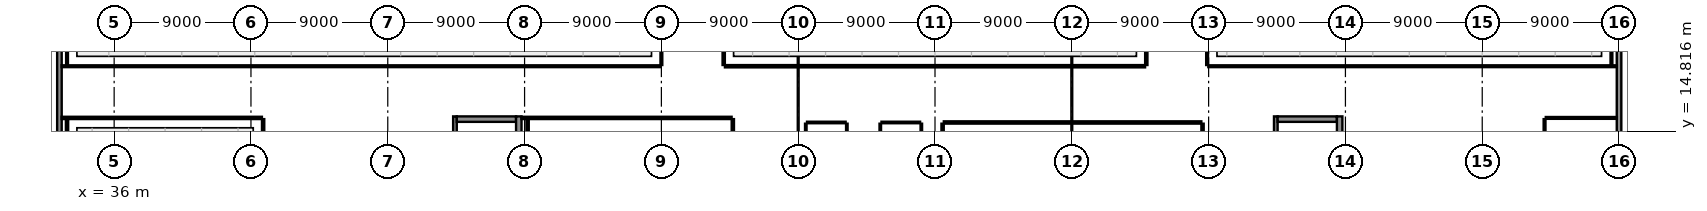
"""IFC4 building model, lengths in metres.
Left out: names, types, materials, properties, quantities, classifications, styles, units other than length and angle.
Written with IfcOpenShell. Run it as: python <this file> out.ifc"""

import sys

from ifc_helpers import new_model, si_unit, direction, frame, frame_2d, origin, place, context, subcontext, project, spatial, rectangle, extrude, element, fill, save


model = new_model("IFC4")
c1 = context("Model", 3, precision=1e-05, world=origin(), true_north=direction((0.0, 1.0)))
c2 = subcontext(c1, "Body", "Model", "MODEL_VIEW")
j1 = project(units=[si_unit("LENGTHUNIT", "METRE"), si_unit("PLANEANGLEUNIT", "RADIAN")], contexts=[c1])
p1 = place(None, origin())
s1 = spatial("IfcSite", under=j1, at=p1, CompositionType="ELEMENT")
p2 = place(p1, origin())
s2 = spatial("IfcBuilding", under=s1, at=p2, CompositionType="ELEMENT")
p3 = place(p2, frame((0.0, 0.0, 5.4)))
s3 = spatial("IfcBuildingStorey", under=s2, at=p3, CompositionType="ELEMENT", Elevation=5.4)
p4 = place(p3, frame((32.4, 23.96, 0.0), z_axis=(0.0, 0.0, 1.0), x_axis=(0.0, -1.0, 0.0)))
e1 = element("IfcWall", 1, at=p4, inside=s3, PredefinedType="SOLIDWALL", context=c2, shape_type="SweptSolid", body=[
    extrude(rectangle(XDim=11.97, YDim=0.3, at=frame_2d((5.985, 0.0))), origin(), (0.0, 0.0, 1.0), 3.455),
])
p5 = place(p4, frame((2.941, 0.0, 0.9)))
e2 = element("IfcOpeningElement", 2, at=p5, cuts=e1, PredefinedType="OPENING", context=c2, shape_type="SweptSolid", body=[
    extrude(rectangle(XDim=1.3, YDim=1.3, at=frame_2d((0.65, 0.65))), frame((0.0, 0.165, 0.0), z_axis=(0.0, -1.0, 0.0), x_axis=(1.0, 0.0, 0.0)), (0.0, 0.0, 1.0), 0.33),
])
p6 = place(p4, frame((8.5, 0.0, 0.9)))
e3 = element("IfcOpeningElement", 3, at=p6, cuts=e1, PredefinedType="OPENING", context=c2, shape_type="SweptSolid", body=[
    extrude(rectangle(XDim=1.3, YDim=1.3, at=frame_2d((0.65, 0.65))), frame((0.0, 0.165, 0.0), z_axis=(0.0, -1.0, 0.0), x_axis=(1.0, 0.0, 0.0)), (0.0, 0.0, 1.0), 0.33),
])
p7 = place(p3, frame((135.0, 12.308, 0.0), z_axis=(0.0, 0.0, 1.0), x_axis=(0.0, 1.0, 0.0)))
e4 = element("IfcWall", 4, at=p7, inside=s3, PredefinedType="SOLIDWALL", context=c2, shape_type="SweptSolid", body=[
    extrude(rectangle(XDim=11.336, YDim=0.3, at=frame_2d((5.668, 0.0))), origin(), (0.0, 0.0, 1.0), 3.575),
])
p8 = place(p7, frame((3.732, 0.0, 0.8)))
e5 = element("IfcOpeningElement", 5, at=p8, cuts=e4, PredefinedType="OPENING", context=c2, shape_type="SweptSolid", body=[
    extrude(rectangle(XDim=2.0, YDim=2.0, at=frame_2d((1.0, 1.0))), frame((0.0, 0.165, 0.0), z_axis=(0.0, -1.0, 0.0), x_axis=(1.0, 0.0, 0.0)), (0.0, 0.0, 1.0), 0.33),
])
p9 = place(p7, frame((7.162, 0.0, 0.8)))
e6 = element("IfcOpeningElement", 6, at=p9, cuts=e4, PredefinedType="OPENING", context=c2, shape_type="SweptSolid", body=[
    extrude(rectangle(XDim=2.0, YDim=2.0, at=frame_2d((1.0, 1.0))), frame((0.0, 0.165, 0.0), z_axis=(0.0, -1.0, 0.0), x_axis=(1.0, 0.0, 0.0)), (0.0, 0.0, 1.0), 0.33),
])
p10 = place(p3, frame((58.42, 13.04, 0.0), z_axis=(0.0, 0.0, 1.0), x_axis=(0.0, 1.0, 0.0)))
e7 = element("IfcWall", 7, at=p10, inside=s3, PredefinedType="SHEAR", context=c2, shape_type="SweptSolid", body=[
    extrude(rectangle(XDim=2.76, YDim=0.24, at=frame_2d((1.38, 0.0))), origin(), (0.0, 0.0, 1.0), 4.16),
])
p11 = place(p3, frame((58.54, 15.62, 0.0), z_axis=(0.0, 0.0, 1.0), x_axis=(1.0, 0.0, 0.0)))
e8 = element("IfcWall", 8, at=p11, inside=s3, PredefinedType="SHEAR", context=c2, shape_type="SweptSolid", body=[
    extrude(rectangle(XDim=3.9, YDim=0.36, at=frame_2d((1.95, 0.0))), origin(), (0.0, 0.0, 1.0), 4.16),
])
p12 = place(p11, frame((1.15, 0.0, 0.0)))
e9 = element("IfcOpeningElement", 9, at=p12, cuts=e8, PredefinedType="OPENING", context=c2, shape_type="SweptSolid", body=[
    extrude(rectangle(XDim=1.6, YDim=2.25, at=frame_2d((0.8, 1.125))), frame((0.0, 0.195, 0.0), z_axis=(0.0, -1.0, 0.0), x_axis=(1.0, 0.0, 0.0)), (0.0, 0.0, 1.0), 0.39),
])
p13 = place(p3, frame((62.62, 6.76, 0.0), z_axis=(0.0, 0.0, 1.0), x_axis=(0.0, 1.0, 0.0)))
e10 = element("IfcWall", 10, at=p13, inside=s3, PredefinedType="SHEAR", context=c2, shape_type="SweptSolid", body=[
    extrude(rectangle(XDim=9.04, YDim=0.36, at=frame_2d((4.52, 0.0))), origin(), (0.0, 0.0, 1.0), 4.16),
])
p14 = place(p3, frame((112.42, 13.04, 0.0), z_axis=(0.0, 0.0, 1.0), x_axis=(0.0, 1.0, 0.0)))
e11 = element("IfcWall", 11, at=p14, inside=s3, PredefinedType="SHEAR", context=c2, shape_type="SweptSolid", body=[
    extrude(rectangle(XDim=2.76, YDim=0.24, at=frame_2d((1.38, 0.0))), origin(), (0.0, 0.0, 1.0), 4.16),
])
p15 = place(p3, frame((112.54, 15.62, 0.0), z_axis=(0.0, 0.0, 1.0), x_axis=(1.0, 0.0, 0.0)))
e12 = element("IfcWall", 12, at=p15, inside=s3, PredefinedType="SHEAR", context=c2, shape_type="SweptSolid", body=[
    extrude(rectangle(XDim=3.9, YDim=0.36, at=frame_2d((1.95, 0.0))), origin(), (0.0, 0.0, 1.0), 4.16),
])
p16 = place(p15, frame((1.15, 0.0, 0.0)))
e13 = element("IfcOpeningElement", 13, at=p16, cuts=e12, PredefinedType="OPENING", context=c2, shape_type="SweptSolid", body=[
    extrude(rectangle(XDim=1.6, YDim=2.25, at=frame_2d((0.8, 1.125))), frame((0.0, 0.195, 0.0), z_axis=(0.0, -1.0, 0.0), x_axis=(1.0, 0.0, 0.0)), (0.0, 0.0, 1.0), 0.39),
])
p17 = place(p3, frame((116.62, 6.76, 0.0), z_axis=(0.0, 0.0, 1.0), x_axis=(0.0, 1.0, 0.0)))
e14 = element("IfcWall", 14, at=p17, inside=s3, PredefinedType="SHEAR", context=c2, shape_type="SweptSolid", body=[
    extrude(rectangle(XDim=9.04, YDim=0.36, at=frame_2d((4.52, 0.0))), origin(), (0.0, 0.0, 1.0), 4.16),
])
p18 = place(p3, frame((32.545, 15.7, 0.0), z_axis=(0.0, 0.0, 1.0), x_axis=(1.0, 0.0, 0.0)))
e15 = element("IfcWall", 15, at=p18, inside=s3, PredefinedType="PARTITIONING", context=c2, shape_type="SweptSolid", body=[
    extrude(rectangle(XDim=13.175, YDim=0.15, at=frame_2d((6.587, 0.0))), origin(), (0.0, 0.0, 1.0), 4.14),
])
p19 = place(p18, frame((6.062, 0.0, 0.0)))
e16 = element("IfcOpeningElement", 16, at=p19, cuts=e15, PredefinedType="OPENING", context=c2, shape_type="SweptSolid", body=[
    extrude(rectangle(XDim=1.05, YDim=2.25, at=frame_2d((0.525, 1.125))), frame((0.0, 0.09, 0.0), z_axis=(0.0, -1.0, 0.0), x_axis=(1.0, 0.0, 0.0)), (0.0, 0.0, 1.0), 0.18),
])
p20 = place(p3, frame((45.8, 15.62, 0.0), z_axis=(0.0, 0.0, 1.0), x_axis=(0.0, -1.0, 0.0)))
e17 = element("IfcWall", 17, at=p20, inside=s3, PredefinedType="PARTITIONING", context=c2, shape_type="SweptSolid", body=[
    extrude(rectangle(XDim=15.475, YDim=0.15, at=frame_2d((7.738, 0.0))), origin(), (0.0, 0.0, 1.0), 4.14),
])
p21 = place(p3, frame((32.9, 0.47, 0.0), z_axis=(0.0, 0.0, 1.0), x_axis=(0.0, 1.0, 0.0)))
e18 = element("IfcWall", 18, at=p21, inside=s3, PredefinedType="PARTITIONING", context=c2, shape_type="SweptSolid", body=[
    extrude(rectangle(XDim=15.16, YDim=0.15, at=frame_2d((7.58, 0.0))), origin(), (0.0, 0.0, 1.0), 4.14),
])
p22 = place(p3, frame((76.7, 15.62, 0.0), z_axis=(0.0, 0.0, 1.0), x_axis=(0.0, -1.0, 0.0)))
e19 = element("IfcWall", 19, at=p22, inside=s3, PredefinedType="PARTITIONING", context=c2, shape_type="SweptSolid", body=[
    extrude(rectangle(XDim=3.04, YDim=0.15, at=frame_2d((1.52, 0.0))), origin(), (0.0, 0.0, 1.0), 4.14),
])
p23 = place(p3, frame((63.2, 12.57, 0.0), z_axis=(0.0, 0.0, 1.0), x_axis=(0.0, 1.0, 0.0)))
e20 = element("IfcWall", 20, at=p23, inside=s3, PredefinedType="PARTITIONING", context=c2, shape_type="SweptSolid", body=[
    extrude(rectangle(XDim=3.05, YDim=0.15, at=frame_2d((1.525, 0.0))), origin(), (0.0, 0.0, 1.0), 3.685),
])
p24 = place(p3, frame((62.795, 15.7, 0.0), z_axis=(0.0, 0.0, 1.0), x_axis=(1.0, 0.0, 0.0)))
e21 = element("IfcWall", 21, at=p24, inside=s3, PredefinedType="PARTITIONING", context=c2, shape_type="SweptSolid", body=[
    extrude(rectangle(XDim=13.825, YDim=0.15, at=frame_2d((6.913, 0.0))), origin(), (0.0, 0.0, 1.0), 4.14),
])
p25 = place(p24, frame((6.388, 0.0, 0.0)))
e22 = element("IfcOpeningElement", 22, at=p25, cuts=e21, PredefinedType="OPENING", context=c2, shape_type="SweptSolid", body=[
    extrude(rectangle(XDim=1.05, YDim=2.25, at=frame_2d((0.525, 1.125))), frame((0.0, 0.09, 0.0), z_axis=(0.0, -1.0, 0.0), x_axis=(1.0, 0.0, 0.0)), (0.0, 0.0, 1.0), 0.18),
])
p26 = place(p3, frame((32.9, 19.18, 0.0), z_axis=(0.0, 0.0, 1.0), x_axis=(0.0, 1.0, 0.0)))
e23 = element("IfcWall", 23, at=p26, inside=s3, PredefinedType="PARTITIONING", context=c2, shape_type="SweptSolid", body=[
    extrude(rectangle(XDim=4.675, YDim=0.12, at=frame_2d((2.337, 0.0))), origin(), (0.0, 0.0, 1.0), 4.14),
])
p27 = place(p3, frame((72.0, 23.52, 0.0), z_axis=(0.0, 0.0, 1.0), x_axis=(0.0, -1.0, 0.0)))
e24 = element("IfcWall", 24, at=p27, inside=s3, PredefinedType="PARTITIONING", context=c2, shape_type="SweptSolid", body=[
    extrude(rectangle(XDim=4.34, YDim=0.12, at=frame_2d((2.17, 0.0))), origin(), (0.0, 0.0, 1.0), 3.625),
])
p28 = place(p3, frame((71.92, 19.1, 0.0), z_axis=(0.0, 0.0, 1.0), x_axis=(-1.0, 0.0, 0.0)))
e25 = element("IfcWall", 25, at=p28, inside=s3, PredefinedType="PARTITIONING", context=c2, shape_type="SweptSolid", body=[
    extrude(rectangle(XDim=39.375, YDim=0.12, at=frame_2d((19.688, 0.0))), origin(), (0.0, 0.0, 1.0), 4.14),
])
p29 = place(p28, frame((19.212, 0.0, 0.0)))
e26 = element("IfcOpeningElement", 26, at=p29, cuts=e25, PredefinedType="OPENING", context=c2, shape_type="SweptSolid", body=[
    extrude(rectangle(XDim=0.95, YDim=2.15, at=frame_2d((0.475, 1.075))), frame((0.0, 0.075, 0.0), z_axis=(0.0, -1.0, 0.0), x_axis=(1.0, 0.0, 0.0)), (0.0, 0.0, 1.0), 0.15),
])
p30 = place(p3, frame((103.82, 19.1, 0.0), z_axis=(0.0, 0.0, 1.0), x_axis=(-1.0, 0.0, 0.0)))
e27 = element("IfcWall", 27, at=p30, inside=s3, PredefinedType="PARTITIONING", context=c2, shape_type="SweptSolid", body=[
    extrude(rectangle(XDim=27.64, YDim=0.15, at=frame_2d((13.82, 0.0))), origin(), (0.0, 0.0, 1.0), 4.14),
])
p31 = place(p30, frame((13.295, 0.0, 0.0)))
e28 = element("IfcOpeningElement", 28, at=p31, cuts=e27, PredefinedType="OPENING", context=c2, shape_type="SweptSolid", body=[
    extrude(rectangle(XDim=1.05, YDim=2.25, at=frame_2d((0.525, 1.125))), frame((0.0, 0.09, 0.0), z_axis=(0.0, -1.0, 0.0), x_axis=(1.0, 0.0, 0.0)), (0.0, 0.0, 1.0), 0.18),
])
for number, where, z_axis, x_axis in (
    (29, (76.1, 19.18, 0.0), (0.0, 0.0, 1.0), (0.0, 1.0, 0.0)),
    (30, (103.9, 23.52, 0.0), (0.0, 0.0, 1.0), (0.0, -1.0, 0.0)),
):
    element("IfcWall", number, at=place(p3, frame(where, z_axis=z_axis, x_axis=x_axis)), inside=s3, PredefinedType="PARTITIONING", context=c2, shape_type="SweptSolid", body=[
        extrude(rectangle(XDim=4.34, YDim=0.15, at=frame_2d((2.17, 0.0))), origin(), (0.0, 0.0, 1.0), 4.14),
    ])
p32 = place(p3, frame((134.5, 24.33, 0.0), z_axis=(0.0, 0.0, 1.0), x_axis=(0.0, -1.0, 0.0)))
e31 = element("IfcWall", 31, at=p32, inside=s3, PredefinedType="PARTITIONING", context=c2, shape_type="SweptSolid", body=[
    extrude(rectangle(XDim=5.15, YDim=0.12, at=frame_2d((2.575, 0.0))), origin(), (0.0, 0.0, 1.0), 4.14),
])
p33 = place(p3, frame((134.855, 19.1, 0.0), z_axis=(0.0, 0.0, 1.0), x_axis=(-1.0, 0.0, 0.0)))
e32 = element("IfcWall", 32, at=p33, inside=s3, PredefinedType="PARTITIONING", context=c2, shape_type="SweptSolid", body=[
    extrude(rectangle(XDim=26.875, YDim=0.12, at=frame_2d((13.438, 0.0))), origin(), (0.0, 0.0, 1.0), 4.14),
])
p34 = place(p33, frame((12.988, 0.0, 0.0)))
e33 = element("IfcOpeningElement", 33, at=p34, cuts=e32, PredefinedType="OPENING", context=c2, shape_type="SweptSolid", body=[
    extrude(rectangle(XDim=0.9, YDim=2.1, at=frame_2d((0.45, 1.05))), frame((0.0, 0.075, 0.0), z_axis=(0.0, -1.0, 0.0), x_axis=(1.0, 0.0, 0.0)), (0.0, 0.0, 1.0), 0.15),
])
p35 = place(p3, frame((107.9, 19.18, 0.0), z_axis=(0.0, 0.0, 1.0), x_axis=(0.0, 1.0, 0.0)))
e34 = element("IfcWall", 34, at=p35, inside=s3, PredefinedType="PARTITIONING", context=c2, shape_type="SweptSolid", body=[
    extrude(rectangle(XDim=4.34, YDim=0.12, at=frame_2d((2.17, 0.0))), origin(), (0.0, 0.0, 1.0), 3.735),
])
p36 = place(p3, frame((130.1, 11.68, 0.0), z_axis=(0.0, 0.0, 1.0), x_axis=(0.0, 1.0, 0.0)))
e35 = element("IfcWall", 35, at=p36, inside=s3, PredefinedType="PARTITIONING", context=c2, shape_type="SweptSolid", body=[
    extrude(rectangle(XDim=3.94, YDim=0.12, at=frame_2d((1.97, 0.0))), origin(), (0.0, 0.0, 1.0), 4.14),
])
p37 = place(p3, frame((130.18, 15.7, 0.0), z_axis=(0.0, 0.0, 1.0), x_axis=(1.0, 0.0, 0.0)))
e36 = element("IfcWall", 36, at=p37, inside=s3, PredefinedType="PARTITIONING", context=c2, shape_type="SweptSolid", body=[
    extrude(rectangle(XDim=4.675, YDim=0.12, at=frame_2d((2.337, 0.0))), origin(), (0.0, 0.0, 1.0), 4.14),
])
p38 = place(p37, frame((1.862, 0.0, 0.0)))
e37 = element("IfcOpeningElement", 37, at=p38, cuts=e36, PredefinedType="OPENING", context=c2, shape_type="SweptSolid", body=[
    extrude(rectangle(XDim=0.95, YDim=2.15, at=frame_2d((0.475, 1.075))), frame((0.0, 0.075, 0.0), z_axis=(0.0, -1.0, 0.0), x_axis=(1.0, 0.0, 0.0)), (0.0, 0.0, 1.0), 0.15),
])
p39 = place(p3, frame((81.5, 9.98, 0.0), z_axis=(0.0, 0.0, 1.0), x_axis=(0.0, 1.0, 0.0)))
e38 = element("IfcWall", 38, at=p39, inside=s3, PredefinedType="PARTITIONING", context=c2, shape_type="SweptSolid", body=[
    extrude(rectangle(XDim=5.34, YDim=0.1, at=frame_2d((2.67, 0.0))), origin(), (0.0, 0.0, 1.0), 3.695),
])
p40 = place(p3, frame((81.58, 15.4, 0.0), z_axis=(0.0, 0.0, 1.0), x_axis=(1.0, 0.0, 0.0)))
e39 = element("IfcWall", 39, at=p40, inside=s3, PredefinedType="PARTITIONING", context=c2, shape_type="SweptSolid", body=[
    extrude(rectangle(XDim=2.54, YDim=0.1, at=frame_2d((1.27, 0.0))), origin(), (0.0, 0.0, 1.0), 4.14),
])
p41 = place(p3, frame((84.2, 15.32, 0.0), z_axis=(0.0, 0.0, 1.0), x_axis=(0.0, -1.0, 0.0)))
e40 = element("IfcWall", 40, at=p41, inside=s3, PredefinedType="PARTITIONING", context=c2, shape_type="SweptSolid", body=[
    extrude(rectangle(XDim=5.34, YDim=0.1, at=frame_2d((2.67, 0.0))), origin(), (0.0, 0.0, 1.0), 4.14),
])
p42 = place(p41, frame((2.22, 0.0, 0.0)))
e41 = element("IfcOpeningElement", 41, at=p42, cuts=e40, PredefinedType="OPENING", context=c2, shape_type="SweptSolid", body=[
    extrude(rectangle(XDim=0.9, YDim=2.05, at=frame_2d((0.45, 1.025))), frame((0.0, 0.065, 0.0), z_axis=(0.0, -1.0, 0.0), x_axis=(1.0, 0.0, 0.0)), (0.0, 0.0, 1.0), 0.13),
])
p43 = place(p3, frame((86.4, 9.88, 0.0), z_axis=(0.0, 0.0, 1.0), x_axis=(0.0, 1.0, 0.0)))
e42 = element("IfcWall", 42, at=p43, inside=s3, PredefinedType="PARTITIONING", context=c2, shape_type="SweptSolid", body=[
    extrude(rectangle(XDim=5.44, YDim=0.1, at=frame_2d((2.72, 0.0))), origin(), (0.0, 0.0, 1.0), 4.14),
])
p44 = place(p43, frame((2.22, 0.0, 0.0)))
e43 = element("IfcOpeningElement", 43, at=p44, cuts=e42, PredefinedType="OPENING", context=c2, shape_type="SweptSolid", body=[
    extrude(rectangle(XDim=1.0, YDim=2.1, at=frame_2d((0.5, 1.05))), frame((0.0, 0.065, 0.0), z_axis=(0.0, -1.0, 0.0), x_axis=(1.0, 0.0, 0.0)), (0.0, 0.0, 1.0), 0.13),
])
p45 = place(p3, frame((86.48, 15.4, 0.0), z_axis=(0.0, 0.0, 1.0), x_axis=(1.0, 0.0, 0.0)))
e44 = element("IfcWall", 44, at=p45, inside=s3, PredefinedType="PARTITIONING", context=c2, shape_type="SweptSolid", body=[
    extrude(rectangle(XDim=2.54, YDim=0.1, at=frame_2d((1.27, 0.0))), origin(), (0.0, 0.0, 1.0), 4.14),
])
p46 = place(p3, frame((89.1, 15.32, 0.0), z_axis=(0.0, 0.0, 1.0), x_axis=(0.0, -1.0, 0.0)))
e45 = element("IfcWall", 45, at=p46, inside=s3, PredefinedType="PARTITIONING", context=c2, shape_type="SweptSolid", body=[
    extrude(rectangle(XDim=5.44, YDim=0.1, at=frame_2d((2.72, 0.0))), origin(), (0.0, 0.0, 1.0), 4.14),
])
for number, where, z_axis, x_axis in (
    (46, (107.6, 15.32, 0.0), (0.0, 0.0, 1.0), (0.0, -1.0, 0.0)),
    (47, (90.5, 3.67, 0.0), (0.0, 0.0, 1.0), (0.0, 1.0, 0.0)),
):
    element("IfcWall", number, at=place(p3, frame(where, z_axis=z_axis, x_axis=x_axis)), inside=s3, PredefinedType="PARTITIONING", context=c2, shape_type="SweptSolid", body=[
        extrude(rectangle(XDim=11.65, YDim=0.15, at=frame_2d((5.825, 0.0))), origin(), (0.0, 0.0, 1.0), 4.14),
    ])
p47 = place(p3, frame((90.58, 15.4, 0.0), z_axis=(0.0, 0.0, 1.0), x_axis=(1.0, 0.0, 0.0)))
e48 = element("IfcWall", 48, at=p47, inside=s3, PredefinedType="PARTITIONING", context=c2, shape_type="SweptSolid", body=[
    extrude(rectangle(XDim=16.94, YDim=0.15, at=frame_2d((8.47, 0.0))), origin(), (0.0, 0.0, 1.0), 4.14),
])
p48 = place(p47, frame((7.945, 0.0, 0.0)))
e49 = element("IfcOpeningElement", 49, at=p48, cuts=e48, PredefinedType="OPENING", context=c2, shape_type="SweptSolid", body=[
    extrude(rectangle(XDim=1.05, YDim=2.25, at=frame_2d((0.525, 1.125))), frame((0.0, 0.09, 0.0), z_axis=(0.0, -1.0, 0.0), x_axis=(1.0, 0.0, 0.0)), (0.0, 0.0, 1.0), 0.18),
])
p49 = place(p5, origin())
e50 = element("IfcWindow", 50, at=p49, inside=s3, PartitioningType="SINGLE_PANEL", PredefinedType="WINDOW", context=c2, shape_type="SweptSolid", body=[
    extrude(rectangle(XDim=1.3, YDim=1.3, at=frame_2d((0.65, 0.65))), frame((0.0, 0.03, 0.0), z_axis=(0.0, -1.0, 0.0), x_axis=(1.0, 0.0, 0.0)), (0.0, 0.0, 1.0), 0.06),
])
fill(e2, e50)
p50 = place(p6, origin())
e51 = element("IfcWindow", 51, at=p50, inside=s3, PartitioningType="SINGLE_PANEL", PredefinedType="WINDOW", context=c2, shape_type="SweptSolid", body=[
    extrude(rectangle(XDim=1.3, YDim=1.3, at=frame_2d((0.65, 0.65))), frame((0.0, 0.03, 0.0), z_axis=(0.0, -1.0, 0.0), x_axis=(1.0, 0.0, 0.0)), (0.0, 0.0, 1.0), 0.06),
])
fill(e3, e51)
p51 = place(p8, origin())
e52 = element("IfcWindow", 52, at=p51, inside=s3, PartitioningType="SINGLE_PANEL", PredefinedType="WINDOW", context=c2, shape_type="SweptSolid", body=[
    extrude(rectangle(XDim=2.0, YDim=2.0, at=frame_2d((1.0, 1.0))), frame((0.0, 0.03, 0.0), z_axis=(0.0, -1.0, 0.0), x_axis=(1.0, 0.0, 0.0)), (0.0, 0.0, 1.0), 0.06),
])
fill(e5, e52)
p52 = place(p9, origin())
e53 = element("IfcWindow", 53, at=p52, inside=s3, PartitioningType="SINGLE_PANEL", PredefinedType="WINDOW", context=c2, shape_type="SweptSolid", body=[
    extrude(rectangle(XDim=2.0, YDim=2.0, at=frame_2d((1.0, 1.0))), frame((0.0, 0.03, 0.0), z_axis=(0.0, -1.0, 0.0), x_axis=(1.0, 0.0, 0.0)), (0.0, 0.0, 1.0), 0.06),
])
fill(e6, e53)
p53 = place(p12, origin())
e54 = element("IfcDoor", 54, at=p53, inside=s3, OperationType="DOUBLE_DOOR_SINGLE_SWING", PredefinedType="DOOR", context=c2, shape_type="SweptSolid", body=[
    extrude(rectangle(XDim=1.6, YDim=2.25, at=frame_2d((0.8, 1.125))), frame((0.0, 0.025, 0.0), z_axis=(0.0, -1.0, 0.0), x_axis=(1.0, 0.0, 0.0)), (0.0, 0.0, 1.0), 0.05),
])
fill(e9, e54)
p54 = place(p16, origin())
e55 = element("IfcDoor", 55, at=p54, inside=s3, OperationType="DOUBLE_DOOR_SINGLE_SWING", PredefinedType="DOOR", context=c2, shape_type="SweptSolid", body=[
    extrude(rectangle(XDim=1.6, YDim=2.25, at=frame_2d((0.8, 1.125))), frame((0.0, 0.025, 0.0), z_axis=(0.0, -1.0, 0.0), x_axis=(1.0, 0.0, 0.0)), (0.0, 0.0, 1.0), 0.05),
])
fill(e13, e55)
p55 = place(p19, frame((1.05, 0.0, 0.0), z_axis=(0.0, 0.0, 1.0), x_axis=(-1.0, 0.0, 0.0)))
e56 = element("IfcDoor", 56, at=p55, inside=s3, OperationType="SINGLE_SWING_RIGHT", PredefinedType="DOOR", context=c2, shape_type="SweptSolid", body=[
    extrude(rectangle(XDim=1.05, YDim=2.25, at=frame_2d((0.525, 1.125))), frame((0.0, 0.025, 0.0), z_axis=(0.0, -1.0, 0.0), x_axis=(1.0, 0.0, 0.0)), (0.0, 0.0, 1.0), 0.05),
])
fill(e16, e56)
p56 = place(p25, frame((1.05, 0.0, 0.0), z_axis=(0.0, 0.0, 1.0), x_axis=(-1.0, 0.0, 0.0)))
e57 = element("IfcDoor", 57, at=p56, inside=s3, OperationType="SINGLE_SWING_RIGHT", PredefinedType="DOOR", context=c2, shape_type="SweptSolid", body=[
    extrude(rectangle(XDim=1.05, YDim=2.25, at=frame_2d((0.525, 1.125))), frame((0.0, 0.025, 0.0), z_axis=(0.0, -1.0, 0.0), x_axis=(1.0, 0.0, 0.0)), (0.0, 0.0, 1.0), 0.05),
])
fill(e22, e57)
p57 = place(p29, origin())
e58 = element("IfcDoor", 58, at=p57, inside=s3, OperationType="SINGLE_SWING_LEFT", PredefinedType="DOOR", context=c2, shape_type="SweptSolid", body=[
    extrude(rectangle(XDim=0.95, YDim=2.15, at=frame_2d((0.475, 1.075))), frame((0.0, 0.025, 0.0), z_axis=(0.0, -1.0, 0.0), x_axis=(1.0, 0.0, 0.0)), (0.0, 0.0, 1.0), 0.05),
])
fill(e26, e58)
p58 = place(p31, frame((1.05, 0.0, 0.0), z_axis=(0.0, 0.0, 1.0), x_axis=(-1.0, 0.0, 0.0)))
e59 = element("IfcDoor", 59, at=p58, inside=s3, OperationType="SINGLE_SWING_RIGHT", PredefinedType="DOOR", context=c2, shape_type="SweptSolid", body=[
    extrude(rectangle(XDim=1.05, YDim=2.25, at=frame_2d((0.525, 1.125))), frame((0.0, 0.025, 0.0), z_axis=(0.0, -1.0, 0.0), x_axis=(1.0, 0.0, 0.0)), (0.0, 0.0, 1.0), 0.05),
])
fill(e28, e59)
p59 = place(p34, origin())
e60 = element("IfcDoor", 60, at=p59, inside=s3, OperationType="SINGLE_SWING_LEFT", PredefinedType="DOOR", context=c2, shape_type="SweptSolid", body=[
    extrude(rectangle(XDim=0.9, YDim=2.1, at=frame_2d((0.45, 1.05))), frame((0.0, 0.025, 0.0), z_axis=(0.0, -1.0, 0.0), x_axis=(1.0, 0.0, 0.0)), (0.0, 0.0, 1.0), 0.05),
])
fill(e33, e60)
p60 = place(p38, origin())
e61 = element("IfcDoor", 61, at=p60, inside=s3, OperationType="SINGLE_SWING_LEFT", PredefinedType="DOOR", context=c2, shape_type="SweptSolid", body=[
    extrude(rectangle(XDim=0.95, YDim=2.15, at=frame_2d((0.475, 1.075))), frame((0.0, 0.025, 0.0), z_axis=(0.0, -1.0, 0.0), x_axis=(1.0, 0.0, 0.0)), (0.0, 0.0, 1.0), 0.05),
])
fill(e37, e61)
p61 = place(p48, frame((1.05, 0.0, 0.0), z_axis=(0.0, 0.0, 1.0), x_axis=(-1.0, 0.0, 0.0)))
e62 = element("IfcDoor", 62, at=p61, inside=s3, OperationType="SINGLE_SWING_RIGHT", PredefinedType="DOOR", context=c2, shape_type="SweptSolid", body=[
    extrude(rectangle(XDim=1.05, YDim=2.25, at=frame_2d((0.525, 1.125))), frame((0.0, 0.025, 0.0), z_axis=(0.0, -1.0, 0.0), x_axis=(1.0, 0.0, 0.0)), (0.0, 0.0, 1.0), 0.05),
])
fill(e49, e62)
save(model, sys.argv[1])
